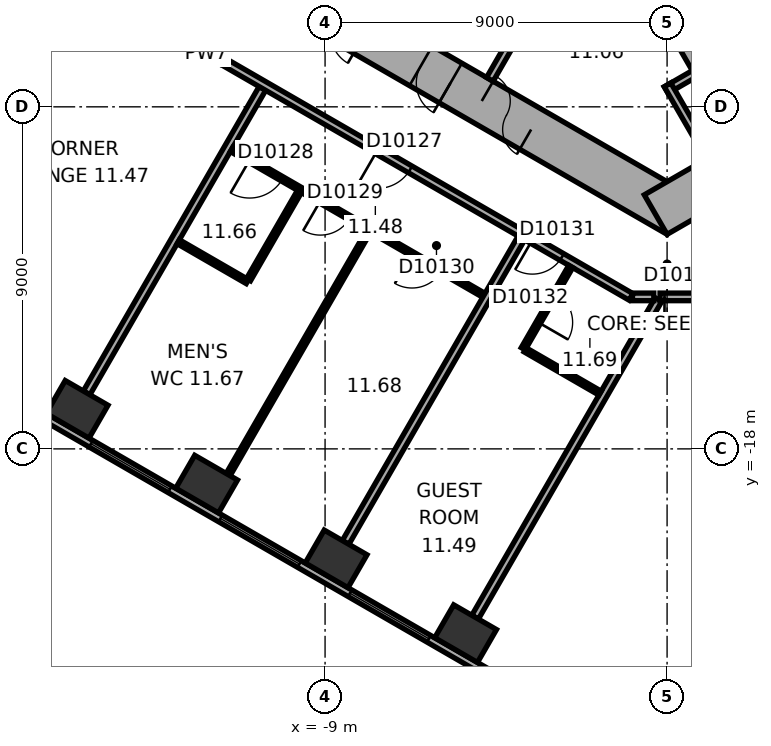
"""IFC4 building model, lengths in metres.
Left out: names, types, materials, properties, quantities, classifications, styles, units other than length and angle.
Written with IfcOpenShell. Run it as: python <this file> out.ifc"""

import sys

from ifc_helpers import new_model, si_unit, direction, frame, frame_2d, origin, origin_2d, place, context, subcontext, project, spatial, rectangle, extrude, element, fill, save


model = new_model("IFC4")
c1 = context("Model", 3, precision=1e-05, world=origin(), true_north=direction((0.0, 1.0)))
c2 = subcontext(c1, "Body", "Model", "MODEL_VIEW")
j1 = project(units=[si_unit("LENGTHUNIT", "METRE"), si_unit("PLANEANGLEUNIT", "RADIAN")], contexts=[c1])
p1 = place(None, origin())
s1 = spatial("IfcSite", under=j1, at=p1, CompositionType="ELEMENT")
p2 = place(p1, origin())
s2 = spatial("IfcBuilding", under=s1, at=p2, CompositionType="ELEMENT")
p3 = place(p2, frame((0.0, 0.0, 57.2)))
s3 = spatial("IfcBuildingStorey", under=s2, at=p3, CompositionType="ELEMENT", Elevation=57.2)
for number, where, z_axis, x_axis in (
    (1, (-15.524, -16.96, 0.0), (0.0, 0.0, 1.0), (0.866, -0.5, 0.0)),
    (2, (-12.117, -18.927, 0.0), (0.0, 0.0, 1.0), (0.866, -0.5, 0.0)),
    (3, (-8.71, -20.895, 0.0), (0.0, 0.0, 1.0), (0.866, -0.5, 0.0)),
    (4, (-5.302, -22.862, 0.0), (0.0, 0.0, 1.0), (0.866, -0.5, 0.0)),
):
    element("IfcColumn", number, at=place(p3, frame(where, z_axis=z_axis, x_axis=x_axis)), inside=s3, PredefinedType="COLUMN", context=c2, shape_type="SweptSolid", body=[
        extrude(rectangle(XDim=1.3, YDim=1.0, at=origin_2d()), origin(), (0.0, 0.0, 1.0), 3.3),
    ])
p4 = place(p3, frame((-10.4, -5.658, 0.0), z_axis=(0.0, 0.0, 1.0), x_axis=(0.866021384402, -0.500006961711, 0.0)))
e5 = element("IfcWall", 5, at=p4, inside=s3, PredefinedType="SHEAR", context=c2, shape_type="SweptSolid", body=[
    extrude(rectangle(XDim=12.355, YDim=1.2, at=frame_2d((6.178, 0.0))), origin(), (0.0, 0.0, 1.0), 3.3),
])
p5 = place(p4, frame((6.378, 0.0, 0.0)))
e6 = element("IfcOpeningElement", 6, at=p5, cuts=e5, PredefinedType="OPENING", context=c2, shape_type="SweptSolid", body=[
    extrude(rectangle(XDim=1.5, YDim=2.1, at=frame_2d((0.75, 1.05))), frame((0.0, 0.61, 0.0), z_axis=(0.0, -1.0, 0.0), x_axis=(1.0, 0.0, 0.0)), (0.0, 0.0, 1.0), 1.22),
])
p6 = place(p4, frame((1.928, 0.0, 0.0)))
e7 = element("IfcOpeningElement", 7, at=p6, cuts=e5, PredefinedType="OPENING", context=c2, shape_type="SweptSolid", body=[
    extrude(rectangle(XDim=0.9, YDim=2.1, at=frame_2d((0.45, 1.05))), frame((0.0, 0.61, 0.0), z_axis=(0.0, -1.0, 0.0), x_axis=(1.0, 0.0, 0.0)), (0.0, 0.0, 1.0), 1.22),
])
p7 = place(p4, frame((4.528, 0.0, 0.0)))
e8 = element("IfcOpeningElement", 8, at=p7, cuts=e5, PredefinedType="OPENING", context=c2, shape_type="SweptSolid", body=[
    extrude(rectangle(XDim=0.9, YDim=2.1, at=frame_2d((0.45, 1.05))), frame((0.0, 0.61, 0.0), z_axis=(0.0, -1.0, 0.0), x_axis=(1.0, 0.0, 0.0)), (0.0, 0.0, 1.0), 1.22),
])
p8 = place(p3, frame((-0.3, -11.836, 0.0), z_axis=(0.0, 0.0, 1.0), x_axis=(0.866021384402, 0.500006961711, 0.0)))
e9 = element("IfcWall", 9, at=p8, inside=s3, PredefinedType="SHEAR", context=c2, shape_type="SweptSolid", body=[
    extrude(rectangle(XDim=12.355, YDim=1.2, at=frame_2d((6.178, 0.0))), origin(), (0.0, 0.0, 1.0), 3.3),
])
p9 = place(p8, frame((4.128, 0.0, 0.0)))
e10 = element("IfcOpeningElement", 10, at=p9, cuts=e9, PredefinedType="OPENING", context=c2, shape_type="SweptSolid", body=[
    extrude(rectangle(XDim=0.9, YDim=2.1, at=frame_2d((0.45, 1.05))), frame((0.0, 0.61, 0.0), z_axis=(0.0, -1.0, 0.0), x_axis=(1.0, 0.0, 0.0)), (0.0, 0.0, 1.0), 1.22),
])
p10 = place(p8, frame((7.928, 0.0, 0.0)))
e11 = element("IfcOpeningElement", 11, at=p10, cuts=e9, PredefinedType="OPENING", context=c2, shape_type="SweptSolid", body=[
    extrude(rectangle(XDim=1.1, YDim=2.1, at=frame_2d((0.55, 1.05))), frame((0.0, 0.61, 0.0), z_axis=(0.0, -1.0, 0.0), x_axis=(1.0, 0.0, 0.0)), (0.0, 0.0, 1.0), 1.22),
])
p11 = place(p3, frame((-19.914, -15.119, 0.0), z_axis=(0.0, 0.0, 1.0), x_axis=(0.866025418898, -0.499999973822, 0.0)))
e12 = element("IfcWall", 12, at=p11, inside=s3, PredefinedType="STANDARD", context=c2, shape_type="SweptSolid", body=[
    extrude(rectangle(XDim=21.246, YDim=0.2, at=frame_2d((10.623, 0.0))), origin(), (0.0, 0.0, 1.0), 3.3),
])
p12 = place(p11, frame((1.555, 0.0, 0.8)))
e13 = element("IfcOpeningElement", 13, at=p12, cuts=e12, PredefinedType="OPENING", context=c2, shape_type="SweptSolid", body=[
    extrude(rectangle(XDim=2.4, YDim=1.7, at=frame_2d((1.2, 0.85))), frame((0.0, 0.11, 0.0), z_axis=(0.0, -1.0, 0.0), x_axis=(1.0, 0.0, 0.0)), (0.0, 0.0, 1.0), 0.22),
])
p13 = place(p11, frame((5.489, 0.0, 0.8)))
e14 = element("IfcOpeningElement", 14, at=p13, cuts=e12, PredefinedType="OPENING", context=c2, shape_type="SweptSolid", body=[
    extrude(rectangle(XDim=2.4, YDim=1.7, at=frame_2d((1.2, 0.85))), frame((0.0, 0.11, 0.0), z_axis=(0.0, -1.0, 0.0), x_axis=(1.0, 0.0, 0.0)), (0.0, 0.0, 1.0), 0.22),
])
p14 = place(p11, frame((9.424, 0.0, 0.8)))
e15 = element("IfcOpeningElement", 15, at=p14, cuts=e12, PredefinedType="OPENING", context=c2, shape_type="SweptSolid", body=[
    extrude(rectangle(XDim=2.4, YDim=1.7, at=frame_2d((1.2, 0.85))), frame((0.0, 0.11, 0.0), z_axis=(0.0, -1.0, 0.0), x_axis=(1.0, 0.0, 0.0)), (0.0, 0.0, 1.0), 0.22),
])
p15 = place(p11, frame((13.358, 0.0, 0.8)))
e16 = element("IfcOpeningElement", 16, at=p15, cuts=e12, PredefinedType="OPENING", context=c2, shape_type="SweptSolid", body=[
    extrude(rectangle(XDim=2.4, YDim=1.7, at=frame_2d((1.2, 0.85))), frame((0.0, 0.11, 0.0), z_axis=(0.0, -1.0, 0.0), x_axis=(1.0, 0.0, 0.0)), (0.0, 0.0, 1.0), 0.22),
])
p16 = place(p11, frame((17.293, 0.0, 0.8)))
e17 = element("IfcOpeningElement", 17, at=p16, cuts=e12, PredefinedType="OPENING", context=c2, shape_type="SweptSolid", body=[
    extrude(rectangle(XDim=2.4, YDim=1.7, at=frame_2d((1.2, 0.85))), frame((0.0, 0.11, 0.0), z_axis=(0.0, -1.0, 0.0), x_axis=(1.0, 0.0, 0.0)), (0.0, 0.0, 1.0), 0.22),
])
p17 = place(p3, frame((-3.563, -6.372, 0.0), z_axis=(0.0, 0.0, 1.0), x_axis=(-0.499994660107, -0.866028486751, 0.0)))
e18 = element("IfcWall", 18, at=p17, inside=s3, PredefinedType="PARTITIONING", context=c2, shape_type="SweptSolid", body=[
    extrude(rectangle(XDim=2.2, YDim=0.2, at=frame_2d((1.1, 0.0))), origin(), (0.0, 0.0, 1.0), 3.05),
])
p18 = place(p3, frame((-0.024, -8.559, 0.0), z_axis=(0.0, 0.0, 1.0), x_axis=(0.866026010844, 0.49999894854, 0.0)))
e19 = element("IfcWall", 19, at=p18, inside=s3, PredefinedType="PARTITIONING", context=c2, shape_type="SweptSolid", body=[
    extrude(rectangle(XDim=8.0, YDim=0.2, at=frame_2d((4.0, 0.0))), origin(), (0.0, 0.0, 1.0), 3.05),
])
p19 = place(p3, frame((0.013, -8.422, 0.0), z_axis=(0.0, 0.0, 1.0), x_axis=(0.500077893725, -0.86598042715, 0.0)))
e20 = element("IfcWall", 20, at=p19, inside=s3, PredefinedType="PARTITIONING", context=c2, shape_type="SweptSolid", body=[
    extrude(rectangle(XDim=2.2, YDim=0.2, at=frame_2d((1.1, 0.0))), origin(), (0.0, 0.0, 1.0), 3.05),
])
p20 = place(p3, frame((-1.558, -3.902, 0.0), z_axis=(0.0, 0.0, 1.0), x_axis=(0.499977259774, -0.866038532462, 0.0)))
e21 = element("IfcWall", 21, at=p20, inside=s3, PredefinedType="SHEAR", context=c2, shape_type="SweptSolid", body=[
    extrude(rectangle(XDim=4.7, YDim=0.3, at=frame_2d((2.35, 0.0))), origin(), (0.0, 0.0, 1.0), 3.05),
])
p21 = place(p20, frame((0.8, 0.0, 0.0)))
e22 = element("IfcOpeningElement", 22, at=p21, cuts=e21, PredefinedType="OPENING", context=c2, shape_type="SweptSolid", body=[
    extrude(rectangle(XDim=1.2, YDim=2.1, at=frame_2d((0.6, 1.05))), frame((0.0, 0.16, 0.0), z_axis=(0.0, -1.0, 0.0), x_axis=(1.0, 0.0, 0.0)), (0.0, 0.0, 1.0), 0.32),
])
p22 = place(p3, frame((-15.274, -16.527, 0.0), z_axis=(0.0, 0.0, 1.0), x_axis=(0.49998823431, 0.866032196602, 0.0)))
e23 = element("IfcWall", 23, at=p22, inside=s3, PredefinedType="PARTITIONING", context=c2, shape_type="SweptSolid", body=[
    extrude(rectangle(XDim=9.25, YDim=0.2, at=frame_2d((4.625, 0.0))), origin(), (0.0, 0.0, 1.0), 3.05),
])
p23 = place(p3, frame((-12.863, -12.55, 0.0), z_axis=(0.0, 0.0, 1.0), x_axis=(0.866009402589, -0.500027713859, 0.0)))
e24 = element("IfcWall", 24, at=p23, inside=s3, PredefinedType="PARTITIONING", context=c2, shape_type="SweptSolid", body=[
    extrude(rectangle(XDim=2.1, YDim=0.12, at=frame_2d((1.05, 0.0))), origin(), (0.0, 0.0, 1.0), 3.05),
])
p24 = place(p3, frame((-12.6, -6.177, 0.0), z_axis=(0.0, 0.0, 1.0), x_axis=(0.500063520245, -0.865988727248, 0.0)))
e25 = element("IfcWall", 25, at=p24, inside=s3, PredefinedType="PARTITIONING", context=c2, shape_type="SweptSolid", body=[
    extrude(rectangle(XDim=1.9, YDim=0.2, at=frame_2d((0.95, 0.0))), origin(), (0.0, 0.0, 1.0), 3.05),
])
p25 = place(p24, frame((0.45, 0.0, 0.0)))
e26 = element("IfcOpeningElement", 26, at=p25, cuts=e25, PredefinedType="OPENING", context=c2, shape_type="SweptSolid", body=[
    extrude(rectangle(XDim=1.0, YDim=2.1, at=frame_2d((0.5, 1.05))), frame((0.0, 0.11, 0.0), z_axis=(0.0, -1.0, 0.0), x_axis=(1.0, 0.0, 0.0)), (0.0, 0.0, 1.0), 0.22),
])
p26 = place(p3, frame((-11.615, -7.843, 0.0), z_axis=(0.0, 0.0, 1.0), x_axis=(0.866026466995, -0.499998158461, 0.0)))
e27 = element("IfcWall", 27, at=p26, inside=s3, PredefinedType="PARTITIONING", context=c2, shape_type="SweptSolid", body=[
    extrude(rectangle(XDim=12.315, YDim=0.2, at=frame_2d((6.158, 0.0))), origin(), (0.0, 0.0, 1.0), 3.05),
])
p27 = place(p26, frame((4.608, 0.0, 0.0)))
e28 = element("IfcOpeningElement", 28, at=p27, cuts=e27, PredefinedType="OPENING", context=c2, shape_type="SweptSolid", body=[
    extrude(rectangle(XDim=1.0, YDim=2.1, at=frame_2d((0.5, 1.05))), frame((0.0, 0.11, 0.0), z_axis=(0.0, -1.0, 0.0), x_axis=(1.0, 0.0, 0.0)), (0.0, 0.0, 1.0), 0.22),
])
p28 = place(p26, frame((9.317, 0.0, 0.0)))
e29 = element("IfcOpeningElement", 29, at=p28, cuts=e27, PredefinedType="OPENING", context=c2, shape_type="SweptSolid", body=[
    extrude(rectangle(XDim=0.9, YDim=2.1, at=frame_2d((0.45, 1.05))), frame((0.0, 0.11, 0.0), z_axis=(0.0, -1.0, 0.0), x_axis=(1.0, 0.0, 0.0)), (0.0, 0.0, 1.0), 0.22),
])
p29 = place(p3, frame((-11.551, -18.677, 0.0), z_axis=(0.0, 0.0, 1.0), x_axis=(0.500008425378, 0.866020539336, 0.0)))
e30 = element("IfcWall", 30, at=p29, inside=s3, PredefinedType="PARTITIONING", context=c2, shape_type="SweptSolid", body=[
    extrude(rectangle(XDim=7.39, YDim=0.12, at=frame_2d((3.695, 0.0))), origin(), (0.0, 0.0, 1.0), 2.6),
])
p30 = place(p3, frame((-11.463, -10.125, 0.0), z_axis=(0.0, 0.0, 1.0), x_axis=(0.866014882148, -0.500018223566, 0.0)))
e31 = element("IfcWall", 31, at=p30, inside=s3, PredefinedType="PARTITIONING", context=c2, shape_type="SweptSolid", body=[
    extrude(rectangle(XDim=7.669, YDim=0.12, at=frame_2d((3.834, 0.0))), origin(), (0.0, 0.0, 1.0), 3.05),
])
p31 = place(p30, frame((0.55, 0.0, 0.0)))
e32 = element("IfcOpeningElement", 32, at=p31, cuts=e31, PredefinedType="OPENING", context=c2, shape_type="SweptSolid", body=[
    extrude(rectangle(XDim=1.0, YDim=2.1, at=frame_2d((0.5, 1.05))), frame((0.0, 0.07, 0.0), z_axis=(0.0, -1.0, 0.0), x_axis=(1.0, 0.0, 0.0)), (0.0, 0.0, 1.0), 0.14),
])
p32 = place(p30, frame((2.7, 0.0, 0.0)))
e33 = element("IfcOpeningElement", 33, at=p32, cuts=e31, PredefinedType="OPENING", context=c2, shape_type="SweptSolid", body=[
    extrude(rectangle(XDim=0.9, YDim=2.1, at=frame_2d((0.45, 1.05))), frame((0.0, 0.07, 0.0), z_axis=(0.0, -1.0, 0.0), x_axis=(1.0, 0.0, 0.0)), (0.0, 0.0, 1.0), 0.14),
])
p33 = place(p30, frame((5.485, 0.0, 0.0)))
e34 = element("IfcOpeningElement", 34, at=p33, cuts=e31, PredefinedType="OPENING", context=c2, shape_type="SweptSolid", body=[
    extrude(rectangle(XDim=0.9, YDim=2.1, at=frame_2d((0.45, 1.05))), frame((0.0, 0.07, 0.0), z_axis=(0.0, -1.0, 0.0), x_axis=(1.0, 0.0, 0.0)), (0.0, 0.0, 1.0), 0.14),
])
p34 = place(p3, frame((-11.014, -13.548, 0.0), z_axis=(0.0, 0.0, 1.0), x_axis=(0.499980071345, 0.866036909293, 0.0)))
e35 = element("IfcWall", 35, at=p34, inside=s3, PredefinedType="PARTITIONING", context=c2, shape_type="SweptSolid", body=[
    extrude(rectangle(XDim=2.68, YDim=0.12, at=frame_2d((1.34, 0.0))), origin(), (0.0, 0.0, 1.0), 3.05),
])
p35 = place(p3, frame((-8.46, -20.461, 0.0), z_axis=(0.0, 0.0, 1.0), x_axis=(0.499999662836, 0.866025598446, 0.0)))
e36 = element("IfcWall", 36, at=p35, inside=s3, PredefinedType="PARTITIONING", context=c2, shape_type="SweptSolid", body=[
    extrude(rectangle(XDim=9.25, YDim=0.2, at=frame_2d((4.625, 0.0))), origin(), (0.0, 0.0, 1.0), 3.05),
])
p36 = place(p3, frame((-5.052, -22.429, 0.0), z_axis=(0.0, 0.0, 1.0), x_axis=(0.50000569793, 0.866022114058, 0.0)))
e37 = element("IfcWall", 37, at=p36, inside=s3, PredefinedType="PARTITIONING", context=c2, shape_type="SweptSolid", body=[
    extrude(rectangle(XDim=9.65, YDim=0.2, at=frame_2d((4.825, 0.0))), origin(), (0.0, 0.0, 1.0), 3.05),
])
p37 = place(p3, frame((-3.786, -15.366, 0.0), z_axis=(0.0, 0.0, 1.0), x_axis=(0.500004234368, 0.866022959057, 0.0)))
e38 = element("IfcWall", 38, at=p37, inside=s3, PredefinedType="PARTITIONING", context=c2, shape_type="SweptSolid", body=[
    extrude(rectangle(XDim=2.5, YDim=0.12, at=frame_2d((1.25, 0.0))), origin(), (0.0, 0.0, 1.0), 3.05),
])
p38 = place(p37, frame((0.8, 0.0, 0.0)))
e39 = element("IfcOpeningElement", 39, at=p38, cuts=e38, PredefinedType="OPENING", context=c2, shape_type="SweptSolid", body=[
    extrude(rectangle(XDim=0.9, YDim=2.1, at=frame_2d((0.45, 1.05))), frame((0.0, 0.07, 0.0), z_axis=(0.0, -1.0, 0.0), x_axis=(1.0, 0.0, 0.0)), (0.0, 0.0, 1.0), 0.14),
])
p39 = place(p3, frame((-1.764, -16.533, 0.0), z_axis=(0.0, 0.0, 1.0), x_axis=(-0.866008641419, 0.500029032144, 0.0)))
e40 = element("IfcWall", 40, at=p39, inside=s3, PredefinedType="PARTITIONING", context=c2, shape_type="SweptSolid", body=[
    extrude(rectangle(XDim=2.275, YDim=0.12, at=frame_2d((1.137, 0.0))), origin(), (0.0, 0.0, 1.0), 3.05),
])
p40 = place(p3, frame((-0.91, -14.001, 0.0), z_axis=(0.0, 0.0, 1.0), x_axis=(1.0, 0.0, 0.0)))
e41 = element("IfcWall", 41, at=p40, inside=s3, PredefinedType="PARTITIONING", context=c2, shape_type="SweptSolid", body=[
    extrude(rectangle(XDim=0.56, YDim=0.2, at=frame_2d((0.28, 0.0))), origin(), (0.0, 0.0, 1.0), 3.05),
])
p41 = place(p3, frame((-0.186, -14.001, 0.0), z_axis=(0.0, 0.0, 1.0), x_axis=(1.0, 0.0, 0.0)))
e42 = element("IfcWall", 42, at=p41, inside=s3, PredefinedType="PARTITIONING", context=c2, shape_type="SweptSolid", body=[
    extrude(rectangle(XDim=1.136, YDim=0.2, at=frame_2d((0.568, 0.0))), origin(), (0.0, 0.0, 1.0), 3.05),
])
p42 = place(p41, frame((0.118, 0.0, 0.0)))
e43 = element("IfcOpeningElement", 43, at=p42, cuts=e42, PredefinedType="OPENING", context=c2, shape_type="SweptSolid", body=[
    extrude(rectangle(XDim=0.9, YDim=2.1, at=frame_2d((0.45, 1.05))), frame((0.0, 0.11, 0.0), z_axis=(0.0, -1.0, 0.0), x_axis=(1.0, 0.0, 0.0)), (0.0, 0.0, 1.0), 0.22),
])
p43 = place(p13, origin())
e44 = element("IfcWindow", 44, at=p43, inside=s3, PartitioningType="SINGLE_PANEL", PredefinedType="WINDOW", context=c2, shape_type="SweptSolid", body=[
    extrude(rectangle(XDim=2.4, YDim=1.7, at=frame_2d((1.2, 0.85))), frame((0.0, 0.03, 0.0), z_axis=(0.0, -1.0, 0.0), x_axis=(1.0, 0.0, 0.0)), (0.0, 0.0, 1.0), 0.06),
])
fill(e14, e44)
p44 = place(p14, origin())
e45 = element("IfcWindow", 45, at=p44, inside=s3, PartitioningType="SINGLE_PANEL", PredefinedType="WINDOW", context=c2, shape_type="SweptSolid", body=[
    extrude(rectangle(XDim=2.4, YDim=1.7, at=frame_2d((1.2, 0.85))), frame((0.0, 0.03, 0.0), z_axis=(0.0, -1.0, 0.0), x_axis=(1.0, 0.0, 0.0)), (0.0, 0.0, 1.0), 0.06),
])
fill(e15, e45)
p45 = place(p15, origin())
e46 = element("IfcWindow", 46, at=p45, inside=s3, PartitioningType="SINGLE_PANEL", PredefinedType="WINDOW", context=c2, shape_type="SweptSolid", body=[
    extrude(rectangle(XDim=2.4, YDim=1.7, at=frame_2d((1.2, 0.85))), frame((0.0, 0.03, 0.0), z_axis=(0.0, -1.0, 0.0), x_axis=(1.0, 0.0, 0.0)), (0.0, 0.0, 1.0), 0.06),
])
fill(e16, e46)
p46 = place(p5, origin())
e47 = element("IfcDoor", 47, at=p46, inside=s3, OperationType="DOUBLE_DOOR_SINGLE_SWING", PredefinedType="DOOR", context=c2, shape_type="SweptSolid", body=[
    extrude(rectangle(XDim=1.5, YDim=2.1, at=frame_2d((0.75, 1.05))), frame((0.0, 0.025, 0.0), z_axis=(0.0, -1.0, 0.0), x_axis=(1.0, 0.0, 0.0)), (0.0, 0.0, 1.0), 0.05),
])
fill(e6, e47)
p47 = place(p7, origin())
e48 = element("IfcDoor", 48, at=p47, inside=s3, OperationType="SINGLE_SWING_LEFT", PredefinedType="DOOR", context=c2, shape_type="SweptSolid", body=[
    extrude(rectangle(XDim=0.9, YDim=2.1, at=frame_2d((0.45, 1.05))), frame((0.0, 0.025, 0.0), z_axis=(0.0, -1.0, 0.0), x_axis=(1.0, 0.0, 0.0)), (0.0, 0.0, 1.0), 0.05),
])
fill(e8, e48)
p48 = place(p27, origin())
e49 = element("IfcDoor", 49, at=p48, inside=s3, OperationType="SINGLE_SWING_LEFT", PredefinedType="DOOR", context=c2, shape_type="SweptSolid", body=[
    extrude(rectangle(XDim=1.0, YDim=2.1, at=frame_2d((0.5, 1.05))), frame((0.0, 0.025, 0.0), z_axis=(0.0, -1.0, 0.0), x_axis=(1.0, 0.0, 0.0)), (0.0, 0.0, 1.0), 0.05),
])
fill(e28, e49)
p49 = place(p31, origin())
e50 = element("IfcDoor", 50, at=p49, inside=s3, OperationType="SINGLE_SWING_LEFT", PredefinedType="DOOR", context=c2, shape_type="SweptSolid", body=[
    extrude(rectangle(XDim=1.0, YDim=2.1, at=frame_2d((0.5, 1.05))), frame((0.0, 0.025, 0.0), z_axis=(0.0, -1.0, 0.0), x_axis=(1.0, 0.0, 0.0)), (0.0, 0.0, 1.0), 0.05),
])
fill(e32, e50)
p50 = place(p32, origin())
e51 = element("IfcDoor", 51, at=p50, inside=s3, OperationType="SINGLE_SWING_LEFT", PredefinedType="DOOR", context=c2, shape_type="SweptSolid", body=[
    extrude(rectangle(XDim=0.9, YDim=2.1, at=frame_2d((0.45, 1.05))), frame((0.0, 0.025, 0.0), z_axis=(0.0, -1.0, 0.0), x_axis=(1.0, 0.0, 0.0)), (0.0, 0.0, 1.0), 0.05),
])
fill(e33, e51)
p51 = place(p33, origin())
e52 = element("IfcDoor", 52, at=p51, inside=s3, OperationType="SINGLE_SWING_LEFT", PredefinedType="DOOR", context=c2, shape_type="SweptSolid", body=[
    extrude(rectangle(XDim=0.9, YDim=2.1, at=frame_2d((0.45, 1.05))), frame((0.0, 0.025, 0.0), z_axis=(0.0, -1.0, 0.0), x_axis=(1.0, 0.0, 0.0)), (0.0, 0.0, 1.0), 0.05),
])
fill(e34, e52)
p52 = place(p28, origin())
e53 = element("IfcDoor", 53, at=p52, inside=s3, OperationType="SINGLE_SWING_LEFT", PredefinedType="DOOR", context=c2, shape_type="SweptSolid", body=[
    extrude(rectangle(XDim=0.9, YDim=2.1, at=frame_2d((0.45, 1.05))), frame((0.0, 0.025, 0.0), z_axis=(0.0, -1.0, 0.0), x_axis=(1.0, 0.0, 0.0)), (0.0, 0.0, 1.0), 0.05),
])
fill(e29, e53)
p53 = place(p38, origin())
e54 = element("IfcDoor", 54, at=p53, inside=s3, OperationType="SINGLE_SWING_LEFT", PredefinedType="DOOR", context=c2, shape_type="SweptSolid", body=[
    extrude(rectangle(XDim=0.9, YDim=2.1, at=frame_2d((0.45, 1.05))), frame((0.0, 0.025, 0.0), z_axis=(0.0, -1.0, 0.0), x_axis=(1.0, 0.0, 0.0)), (0.0, 0.0, 1.0), 0.05),
])
fill(e39, e54)
p54 = place(p42, origin())
e55 = element("IfcDoor", 55, at=p54, inside=s3, OperationType="SINGLE_SWING_LEFT", PredefinedType="DOOR", context=c2, shape_type="SweptSolid", body=[
    extrude(rectangle(XDim=0.9, YDim=2.1, at=frame_2d((0.45, 1.05))), frame((0.0, 0.025, 0.0), z_axis=(0.0, -1.0, 0.0), x_axis=(1.0, 0.0, 0.0)), (0.0, 0.0, 1.0), 0.05),
])
fill(e43, e55)
save(model, sys.argv[1])
